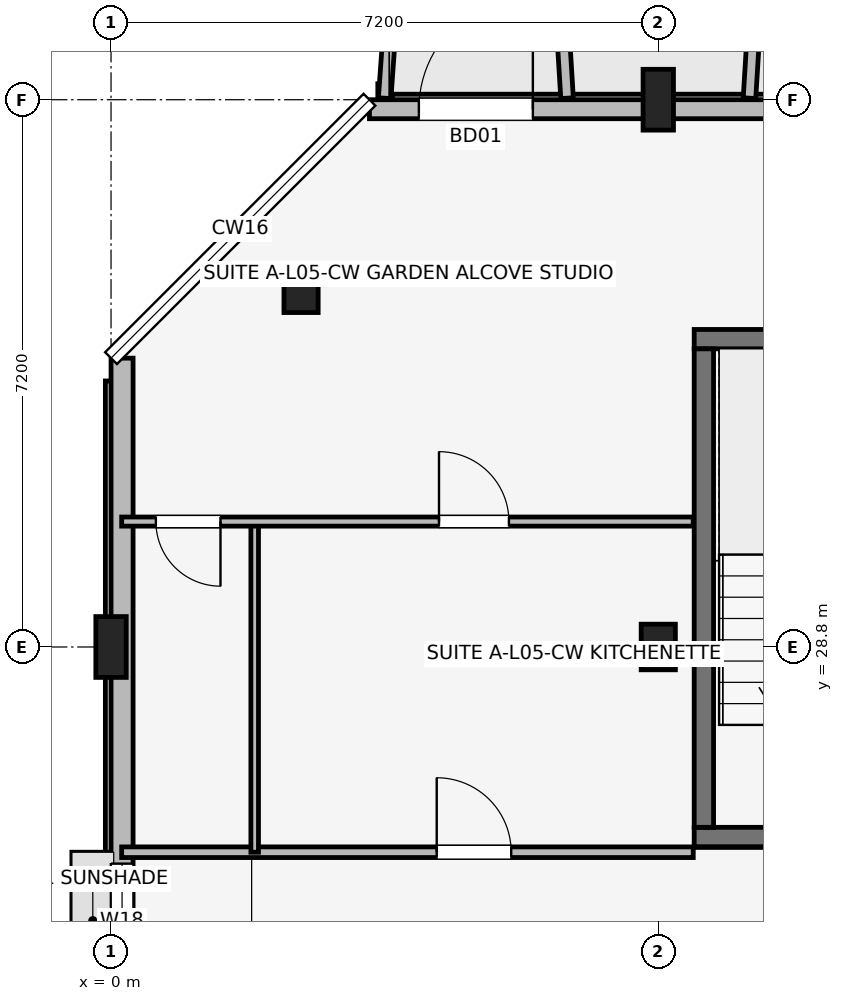
"""IFC4 building model, lengths in metres.
Left out: names, types, materials, properties, quantities, classifications, styles, units other than length and angle.
Written with IfcOpenShell. Run it as: python <this file> out.ifc"""

import sys

from ifc_helpers import new_model, si_unit, direction, frame, frame_2d, origin, origin_2d, place, context, subcontext, project, spatial, rectangle, extrude, element, fill, save


model = new_model("IFC4")
c1 = context("Model", 3, precision=1e-05, world=origin(), true_north=direction((0.0, 1.0)))
c2 = subcontext(c1, "Body", "Model", "MODEL_VIEW")
j1 = project(units=[si_unit("LENGTHUNIT", "METRE"), si_unit("PLANEANGLEUNIT", "RADIAN")], contexts=[c1])
p1 = place(None, origin())
s1 = spatial("IfcSite", under=j1, at=p1, CompositionType="ELEMENT")
p2 = place(p1, origin())
s2 = spatial("IfcBuilding", under=s1, at=p2, CompositionType="ELEMENT")
p3 = place(p2, frame((0.0, 0.0, 18.15)))
s3 = spatial("IfcBuildingStorey", under=s2, at=p3, CompositionType="ELEMENT", Elevation=18.15)
p4 = place(p3, frame((0.0, 28.8, 0.0), z_axis=(0.0, 0.0, 1.0), x_axis=(1.0, 0.0, 0.0)))
e1 = element("IfcColumn", 1, at=p4, inside=s3, PredefinedType="COLUMN", context=c2, shape_type="SweptSolid", body=[
    extrude(rectangle(XDim=0.4, YDim=0.8, at=origin_2d()), origin(), (0.0, 0.0, 1.0), 3.15),
])
for number, where, z_axis, x_axis in (
    (2, (2.5, 33.5, 0.0), (0.0, 0.0, 1.0), (1.0, 0.0, 0.0)),
    (3, (7.2, 28.8, 0.0), (0.0, 0.0, 1.0), (1.0, 0.0, 0.0)),
):
    element("IfcColumn", number, at=place(p3, frame(where, z_axis=z_axis, x_axis=x_axis)), inside=s3, PredefinedType="COLUMN", context=c2, shape_type="SweptSolid", body=[
        extrude(rectangle(XDim=0.45, YDim=0.6, at=origin_2d()), origin(), (0.0, 0.0, 1.0), 3.15),
    ])
p5 = place(p3, frame((7.2, 36.0, 0.0), z_axis=(0.0, 0.0, 1.0), x_axis=(1.0, 0.0, 0.0)))
e4 = element("IfcColumn", 4, at=p5, inside=s3, PredefinedType="COLUMN", context=c2, shape_type="SweptSolid", body=[
    extrude(rectangle(XDim=0.4, YDim=0.8, at=origin_2d()), origin(), (0.0, 0.0, 1.0), 3.15),
])
p6 = place(p3, frame((7.673, 26.3, 0.0), z_axis=(0.0, 0.0, 1.0), x_axis=(1.0, 0.0, 0.0)))
e5 = element("IfcWall", 5, at=p6, inside=s3, PredefinedType="SHEAR", context=c2, shape_type="SweptSolid", body=[
    extrude(rectangle(XDim=3.305, YDim=0.255, at=frame_2d((1.652, 0.0))), origin(), (0.0, 0.0, 1.0), 3.15),
])
p7 = place(p6, frame((2.177, 0.0, 0.0), z_axis=(0.0, 0.0, 1.0), x_axis=(-1.0, 0.0, 0.0)))
e6 = element("IfcOpeningElement", 6, at=p7, cuts=e5, PredefinedType="OPENING", context=c2, shape_type="SweptSolid", body=[
    extrude(rectangle(XDim=1.05, YDim=2.12, at=frame_2d((0.525, 1.06))), frame((0.0, 0.137, 0.0), z_axis=(0.0, -1.0, 0.0), x_axis=(1.0, 0.0, 0.0)), (0.0, 0.0, 1.0), 0.275),
])
p8 = place(p3, frame((7.673, 32.85, 0.0), z_axis=(0.0, 0.0, 1.0), x_axis=(1.0, 0.0, 0.0)))
e7 = element("IfcWall", 7, at=p8, inside=s3, PredefinedType="SHEAR", context=c2, shape_type="SweptSolid", body=[
    extrude(rectangle(XDim=3.305, YDim=0.255, at=frame_2d((1.652, 0.0))), origin(), (0.0, 0.0, 1.0), 3.15),
])
p9 = place(p3, frame((7.8, 26.427, 0.0), z_axis=(0.0, 0.0, 1.0), x_axis=(0.0, 1.0, 0.0)))
e8 = element("IfcWall", 8, at=p9, inside=s3, PredefinedType="SHEAR", context=c2, shape_type="SweptSolid", body=[
    extrude(rectangle(XDim=6.295, YDim=0.255, at=frame_2d((3.147, 0.0))), origin(), (0.0, 0.0, 1.0), 3.15),
])
p10 = place(p3, frame((32.6, 35.875, 0.0), z_axis=(0.0, 0.0, 1.0), x_axis=(-1.0, 0.0, 0.0)))
e9 = element("IfcWall", 9, at=p10, inside=s3, PredefinedType="SOLIDWALL", context=c2, shape_type="SweptSolid", body=[
    extrude(rectangle(XDim=29.2, YDim=0.25, at=frame_2d((14.6, 0.0))), origin(), (0.0, 0.0, 1.0), 2.43),
])
p11 = place(p10, frame((28.55, 0.0, 0.0), z_axis=(0.0, 0.0, 1.0), x_axis=(-1.0, 0.0, 0.0)))
e10 = element("IfcOpeningElement", 10, at=p11, cuts=e9, PredefinedType="OPENING", context=c2, shape_type="SweptSolid", body=[
    extrude(rectangle(XDim=1.5, YDim=2.15, at=frame_2d((0.75, 1.075))), frame((0.0, 0.135, 0.0), z_axis=(0.0, -1.0, 0.0), x_axis=(1.0, 0.0, 0.0)), (0.0, 0.0, 1.0), 0.27),
])
p12 = place(p10, frame((2.225, 0.0, 0.0), z_axis=(0.0, 0.0, 1.0), x_axis=(-1.0, 0.0, 0.0)))
e11 = element("IfcOpeningElement", 11, at=p12, cuts=e9, PredefinedType="OPENING", context=c2, shape_type="SweptSolid", body=[
    extrude(rectangle(XDim=1.65, YDim=2.15, at=frame_2d((0.825, 1.075))), frame((0.0, 0.135, 0.0), z_axis=(0.0, -1.0, 0.0), x_axis=(1.0, 0.0, 0.0)), (0.0, 0.0, 1.0), 0.27),
])
p13 = place(p10, frame((14.83, 0.0, 0.5)))
e12 = element("IfcOpeningElement", 12, at=p13, cuts=e9, PredefinedType="OPENING", context=c2, shape_type="SweptSolid", body=[
    extrude(rectangle(XDim=1.15, YDim=1.68, at=frame_2d((0.575, 0.84))), frame((0.0, 0.135, 0.0), z_axis=(0.0, -1.0, 0.0), x_axis=(1.0, 0.0, 0.0)), (0.0, 0.0, 1.0), 0.27),
])
p14 = place(p10, frame((7.885, 0.0, 0.7)))
e13 = element("IfcOpeningElement", 13, at=p14, cuts=e9, PredefinedType="OPENING", context=c2, shape_type="SweptSolid", body=[
    extrude(rectangle(XDim=1.58, YDim=1.6, at=frame_2d((0.79, 0.8))), frame((0.0, 0.135, 0.0), z_axis=(0.0, -1.0, 0.0), x_axis=(1.0, 0.0, 0.0)), (0.0, 0.0, 1.0), 0.27),
])
p15 = place(p10, frame((19.64, 0.0, 0.7)))
e14 = element("IfcOpeningElement", 14, at=p15, cuts=e9, PredefinedType="OPENING", context=c2, shape_type="SweptSolid", body=[
    extrude(rectangle(XDim=1.72, YDim=1.6, at=frame_2d((0.86, 0.8))), frame((0.0, 0.135, 0.0), z_axis=(0.0, -1.0, 0.0), x_axis=(1.0, 0.0, 0.0)), (0.0, 0.0, 1.0), 0.27),
])
p16 = place(p3, frame((0.145, 32.6, 0.0), z_axis=(0.0, 0.0, 1.0), x_axis=(0.0, -1.0, 0.0)))
e15 = element("IfcWall", 15, at=p16, inside=s3, PredefinedType="SOLIDWALL", context=c2, shape_type="SweptSolid", body=[
    extrude(rectangle(XDim=14.8, YDim=0.29, at=frame_2d((7.4, 0.0))), origin(), (0.0, 0.0, 1.0), 2.38),
])
p17 = place(p16, frame((6.65, 0.0, 1.05)))
e16 = element("IfcOpeningElement", 16, at=p17, cuts=e15, PredefinedType="OPENING", context=c2, shape_type="SweptSolid", body=[
    extrude(rectangle(XDim=1.5, YDim=1.15, at=frame_2d((0.75, 0.575))), frame((0.0, 0.155, 0.0), z_axis=(0.0, -1.0, 0.0), x_axis=(1.0, 0.0, 0.0)), (0.0, 0.0, 1.0), 0.31),
])
p18 = place(p16, frame((12.365, 0.0, 0.72)))
e17 = element("IfcOpeningElement", 17, at=p18, cuts=e15, PredefinedType="OPENING", context=c2, shape_type="SweptSolid", body=[
    extrude(rectangle(XDim=1.3, YDim=1.55, at=frame_2d((0.65, 0.775))), frame((0.0, 0.155, 0.0), z_axis=(0.0, -1.0, 0.0), x_axis=(1.0, 0.0, 0.0)), (0.0, 0.0, 1.0), 0.31),
])
p19 = place(p3, frame((3.6, 36.02, 0.0), z_axis=(0.0, 0.0, 1.0), x_axis=(0.071194071069, 0.997462482625, 0.0)))
e18 = element("IfcWall", 18, at=p19, inside=s3, PredefinedType="ELEMENTEDWALL", context=c2, shape_type="SweptSolid", body=[
    extrude(rectangle(XDim=1.965, YDim=0.165, at=frame_2d((0.982, 0.0))), origin(), (0.0, 0.0, 1.0), 2.95),
])
p20 = place(p3, frame((6.0, 36.02, 0.0), z_axis=(0.0, 0.0, 1.0), x_axis=(-0.061170732449, 0.998127317276, 0.0)))
e19 = element("IfcWall", 19, at=p20, inside=s3, PredefinedType="ELEMENTEDWALL", context=c2, shape_type="SweptSolid", body=[
    extrude(rectangle(XDim=1.964, YDim=0.165, at=frame_2d((0.982, 0.0))), origin(), (0.0, 0.0, 1.0), 2.95),
])
p21 = place(p3, frame((8.4, 36.02, 0.0), z_axis=(0.0, 0.0, 1.0), x_axis=(0.061170732449, 0.998127317276, 0.0)))
e20 = element("IfcWall", 20, at=p21, inside=s3, PredefinedType="ELEMENTEDWALL", context=c2, shape_type="SweptSolid", body=[
    extrude(rectangle(XDim=1.964, YDim=0.165, at=frame_2d((0.982, 0.0))), origin(), (0.0, 0.0, 1.0), 2.53),
])
p22 = place(p3, frame((0.14, 26.1, 0.0), z_axis=(0.0, 0.0, 1.0), x_axis=(1.0, 0.0, 0.0)))
e21 = element("IfcWall", 21, at=p22, inside=s3, PredefinedType="PARTITIONING", context=c2, shape_type="SweptSolid", body=[
    extrude(rectangle(XDim=7.52, YDim=0.14, at=frame_2d((3.76, 0.0))), origin(), (0.0, 0.0, 1.0), 2.38),
])
p23 = place(p22, frame((4.145, 0.0, 0.0)))
e22 = element("IfcOpeningElement", 22, at=p23, cuts=e21, PredefinedType="OPENING", context=c2, shape_type="SweptSolid", body=[
    extrude(rectangle(XDim=0.98, YDim=2.1, at=frame_2d((0.49, 1.05))), frame((0.0, 0.08, 0.0), z_axis=(0.0, -1.0, 0.0), x_axis=(1.0, 0.0, 0.0)), (0.0, 0.0, 1.0), 0.16),
])
p24 = place(p3, frame((1.89, 26.1, 0.0), z_axis=(0.0, 0.0, 1.0), x_axis=(0.0, 1.0, 0.0)))
e23 = element("IfcWall", 23, at=p24, inside=s3, PredefinedType="PARTITIONING", context=c2, shape_type="SweptSolid", body=[
    extrude(rectangle(XDim=4.35, YDim=0.1, at=frame_2d((2.175, 0.0))), origin(), (0.0, 0.0, 1.0), 2.375),
])
p25 = place(p3, frame((0.14, 30.45, 0.0), z_axis=(0.0, 0.0, 1.0), x_axis=(1.0, 0.0, 0.0)))
e24 = element("IfcWall", 24, at=p25, inside=s3, PredefinedType="PARTITIONING", context=c2, shape_type="SweptSolid", body=[
    extrude(rectangle(XDim=7.52, YDim=0.12, at=frame_2d((3.76, 0.0))), origin(), (0.0, 0.0, 1.0), 2.38),
])
p26 = place(p25, frame((1.3, 0.0, 0.0), z_axis=(0.0, 0.0, 1.0), x_axis=(-1.0, 0.0, 0.0)))
e25 = element("IfcOpeningElement", 25, at=p26, cuts=e24, PredefinedType="OPENING", context=c2, shape_type="SweptSolid", body=[
    extrude(rectangle(XDim=0.85, YDim=2.08, at=frame_2d((0.425, 1.04))), frame((0.0, 0.07, 0.0), z_axis=(0.0, -1.0, 0.0), x_axis=(1.0, 0.0, 0.0)), (0.0, 0.0, 1.0), 0.14),
])
p27 = place(p25, frame((4.175, 0.0, 0.0)))
e26 = element("IfcOpeningElement", 26, at=p27, cuts=e24, PredefinedType="OPENING", context=c2, shape_type="SweptSolid", body=[
    extrude(rectangle(XDim=0.92, YDim=2.08, at=frame_2d((0.46, 1.04))), frame((0.0, 0.07, 0.0), z_axis=(0.0, -1.0, 0.0), x_axis=(1.0, 0.0, 0.0)), (0.0, 0.0, 1.0), 0.14),
])
p28 = place(p11, origin())
e27 = element("IfcDoor", 27, at=p28, inside=s3, OperationType="SINGLE_SWING_LEFT", PredefinedType="DOOR", context=c2, shape_type="SweptSolid", body=[
    extrude(rectangle(XDim=1.5, YDim=2.15, at=frame_2d((0.75, 1.075))), frame((0.0, 0.025, 0.0), z_axis=(0.0, -1.0, 0.0), x_axis=(1.0, 0.0, 0.0)), (0.0, 0.0, 1.0), 0.05),
])
fill(e10, e27)
p29 = place(p17, origin())
e28 = element("IfcWindow", 28, at=p29, inside=s3, PartitioningType="SINGLE_PANEL", PredefinedType="WINDOW", context=c2, shape_type="SweptSolid", body=[
    extrude(rectangle(XDim=1.5, YDim=1.15, at=frame_2d((0.75, 0.575))), frame((0.0, 0.03, 0.0), z_axis=(0.0, -1.0, 0.0), x_axis=(1.0, 0.0, 0.0)), (0.0, 0.0, 1.0), 0.06),
])
fill(e16, e28)
p30 = place(p23, origin())
e29 = element("IfcDoor", 29, at=p30, inside=s3, OperationType="SINGLE_SWING_LEFT", PredefinedType="DOOR", context=c2, shape_type="SweptSolid", body=[
    extrude(rectangle(XDim=0.98, YDim=2.1, at=frame_2d((0.49, 1.05))), frame((0.0, 0.025, 0.0), z_axis=(0.0, -1.0, 0.0), x_axis=(1.0, 0.0, 0.0)), (0.0, 0.0, 1.0), 0.05),
])
fill(e22, e29)
p31 = place(p26, origin())
e30 = element("IfcDoor", 30, at=p31, inside=s3, OperationType="SINGLE_SWING_RIGHT", PredefinedType="DOOR", context=c2, shape_type="SweptSolid", body=[
    extrude(rectangle(XDim=0.85, YDim=2.08, at=frame_2d((0.425, 1.04))), frame((0.0, 0.025, 0.0), z_axis=(0.0, -1.0, 0.0), x_axis=(1.0, 0.0, 0.0)), (0.0, 0.0, 1.0), 0.05),
])
fill(e25, e30)
p32 = place(p27, origin())
e31 = element("IfcDoor", 31, at=p32, inside=s3, OperationType="SINGLE_SWING_LEFT", PredefinedType="DOOR", context=c2, shape_type="SweptSolid", body=[
    extrude(rectangle(XDim=0.92, YDim=2.08, at=frame_2d((0.46, 1.04))), frame((0.0, 0.025, 0.0), z_axis=(0.0, -1.0, 0.0), x_axis=(1.0, 0.0, 0.0)), (0.0, 0.0, 1.0), 0.05),
])
fill(e26, e31)
save(model, sys.argv[1])
